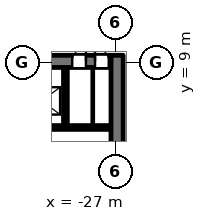
"""IFC4 building model, lengths in metres.
Left out: names, types, materials, properties, quantities, classifications, styles, units other than length and angle.
Written with IfcOpenShell. Run it as: python <this file> out.ifc"""

import sys

from ifc_helpers import new_model, si_unit, direction, frame, frame_2d, origin, place, context, subcontext, project, spatial, rectangle, extrude, element, fill, save


model = new_model("IFC4")
c1 = context("Model", 3, precision=1e-05, world=origin(), true_north=direction((0.0, 1.0)))
c2 = subcontext(c1, "Body", "Model", "MODEL_VIEW")
j1 = project(units=[si_unit("LENGTHUNIT", "METRE"), si_unit("PLANEANGLEUNIT", "RADIAN")], contexts=[c1])
p1 = place(None, origin())
s1 = spatial("IfcSite", under=j1, at=p1, CompositionType="ELEMENT")
p2 = place(p1, origin())
s2 = spatial("IfcBuilding", under=s1, at=p2, CompositionType="ELEMENT")
p3 = place(p2, frame((0.0, 0.0, -4.5)))
s3 = spatial("IfcBuildingStorey", under=s2, at=p3, CompositionType="ELEMENT", Elevation=-4.5)
p4 = place(p3, frame((-44.7, 4.75, 0.0), z_axis=(0.0, 0.0, 1.0), x_axis=(1.0, 0.0, 0.0)))
e1 = element("IfcWall", 1, at=p4, inside=s3, PredefinedType="SHEAR", context=c2, shape_type="SweptSolid", body=[
    extrude(rectangle(XDim=17.4, YDim=0.25, at=frame_2d((8.7, 0.0))), origin(), (0.0, 0.0, 1.0), 4.2),
])
p5 = place(p3, frame((-44.7, 9.1, 0.0), z_axis=(0.0, 0.0, 1.0), x_axis=(1.0, 0.0, 0.0)))
e2 = element("IfcWall", 2, at=p5, inside=s3, PredefinedType="SHEAR", context=c2, shape_type="SweptSolid", body=[
    extrude(rectangle(XDim=17.4, YDim=0.8, at=frame_2d((8.7, 0.0))), origin(), (0.0, 0.0, 1.0), 4.2),
])
p6 = place(p5, frame((8.9, 0.0, 0.0)))
e3 = element("IfcOpeningElement", 3, at=p6, cuts=e2, PredefinedType="OPENING", context=c2, shape_type="SweptSolid", body=[
    extrude(rectangle(XDim=1.2, YDim=2.1, at=frame_2d((0.6, 1.05))), frame((0.0, 0.41, 0.0), z_axis=(0.0, -1.0, 0.0), x_axis=(1.0, 0.0, 0.0)), (0.0, 0.0, 1.0), 0.82),
])
p7 = place(p5, frame((14.85, 0.0, 0.0)))
e4 = element("IfcOpeningElement", 4, at=p7, cuts=e2, PredefinedType="OPENING", context=c2, shape_type="SweptSolid", body=[
    extrude(rectangle(XDim=0.9, YDim=2.1, at=frame_2d((0.45, 1.05))), frame((0.0, 0.41, 0.0), z_axis=(0.0, -1.0, 0.0), x_axis=(1.0, 0.0, 0.0)), (0.0, 0.0, 1.0), 0.82),
])
p8 = place(p5, frame((16.35, 0.0, 0.0)))
e5 = element("IfcOpeningElement", 5, at=p8, cuts=e2, PredefinedType="OPENING", context=c2, shape_type="SweptSolid", body=[
    extrude(rectangle(XDim=0.9, YDim=2.1, at=frame_2d((0.45, 1.05))), frame((0.0, 0.41, 0.0), z_axis=(0.0, -1.0, 0.0), x_axis=(1.0, 0.0, 0.0)), (0.0, 0.0, 1.0), 0.82),
])
p9 = place(p3, frame((-30.3, 4.875, 0.0), z_axis=(0.0, 0.0, 1.0), x_axis=(0.0, 1.0, 0.0)))
e6 = element("IfcWall", 6, at=p9, inside=s3, PredefinedType="SHEAR", context=c2, shape_type="SweptSolid", body=[
    extrude(rectangle(XDim=3.825, YDim=0.25, at=frame_2d((1.913, 0.0))), origin(), (0.0, 0.0, 1.0), 4.2),
])
p10 = place(p3, frame((-28.5, 4.875, 0.0), z_axis=(0.0, 0.0, 1.0), x_axis=(0.0, 1.0, 0.0)))
e7 = element("IfcWall", 7, at=p10, inside=s3, PredefinedType="PARTITIONING", context=c2, shape_type="SweptSolid", body=[
    extrude(rectangle(XDim=3.825, YDim=0.15, at=frame_2d((1.913, 0.0))), origin(), (0.0, 0.0, 1.0), 4.2),
])
p11 = place(p3, frame((-26.9, -9.5, 0.0), z_axis=(0.0, 0.0, 1.0), x_axis=(0.0, 1.0, 0.0)))
e8 = element("IfcWall", 8, at=p11, inside=s3, PredefinedType="SHEAR", context=c2, shape_type="SweptSolid", body=[
    extrude(rectangle(XDim=19.0, YDim=0.8, at=frame_2d((9.5, 0.0))), origin(), (0.0, 0.0, 1.0), 4.2),
])
p12 = place(p11, frame((8.3, 0.0, 0.0)))
e9 = element("IfcOpeningElement", 9, at=p12, cuts=e8, PredefinedType="OPENING", context=c2, shape_type="SweptSolid", body=[
    extrude(rectangle(XDim=2.4, YDim=2.1, at=frame_2d((1.2, 1.05))), frame((0.0, 0.41, 0.0), z_axis=(0.0, -1.0, 0.0), x_axis=(1.0, 0.0, 0.0)), (0.0, 0.0, 1.0), 0.82),
])
p13 = place(p7, origin())
e10 = element("IfcDoor", 10, at=p13, inside=s3, OperationType="SINGLE_SWING_RIGHT", PredefinedType="DOOR", context=c2, shape_type="SweptSolid", body=[
    extrude(rectangle(XDim=0.9, YDim=2.1, at=frame_2d((0.45, 1.05))), frame((0.0, -0.225, 0.0), z_axis=(0.0, -1.0, 0.0), x_axis=(1.0, 0.0, 0.0)), (0.0, 0.0, 1.0), 0.05),
])
fill(e4, e10)
p14 = place(p8, origin())
e11 = element("IfcDoor", 11, at=p14, inside=s3, OperationType="SINGLE_SWING_LEFT", PredefinedType="DOOR", context=c2, shape_type="SweptSolid", body=[
    extrude(rectangle(XDim=0.9, YDim=2.1, at=frame_2d((0.45, 1.05))), frame((0.0, -0.225, 0.0), z_axis=(0.0, -1.0, 0.0), x_axis=(1.0, 0.0, 0.0)), (0.0, 0.0, 1.0), 0.05),
])
fill(e5, e11)
save(model, sys.argv[1])
